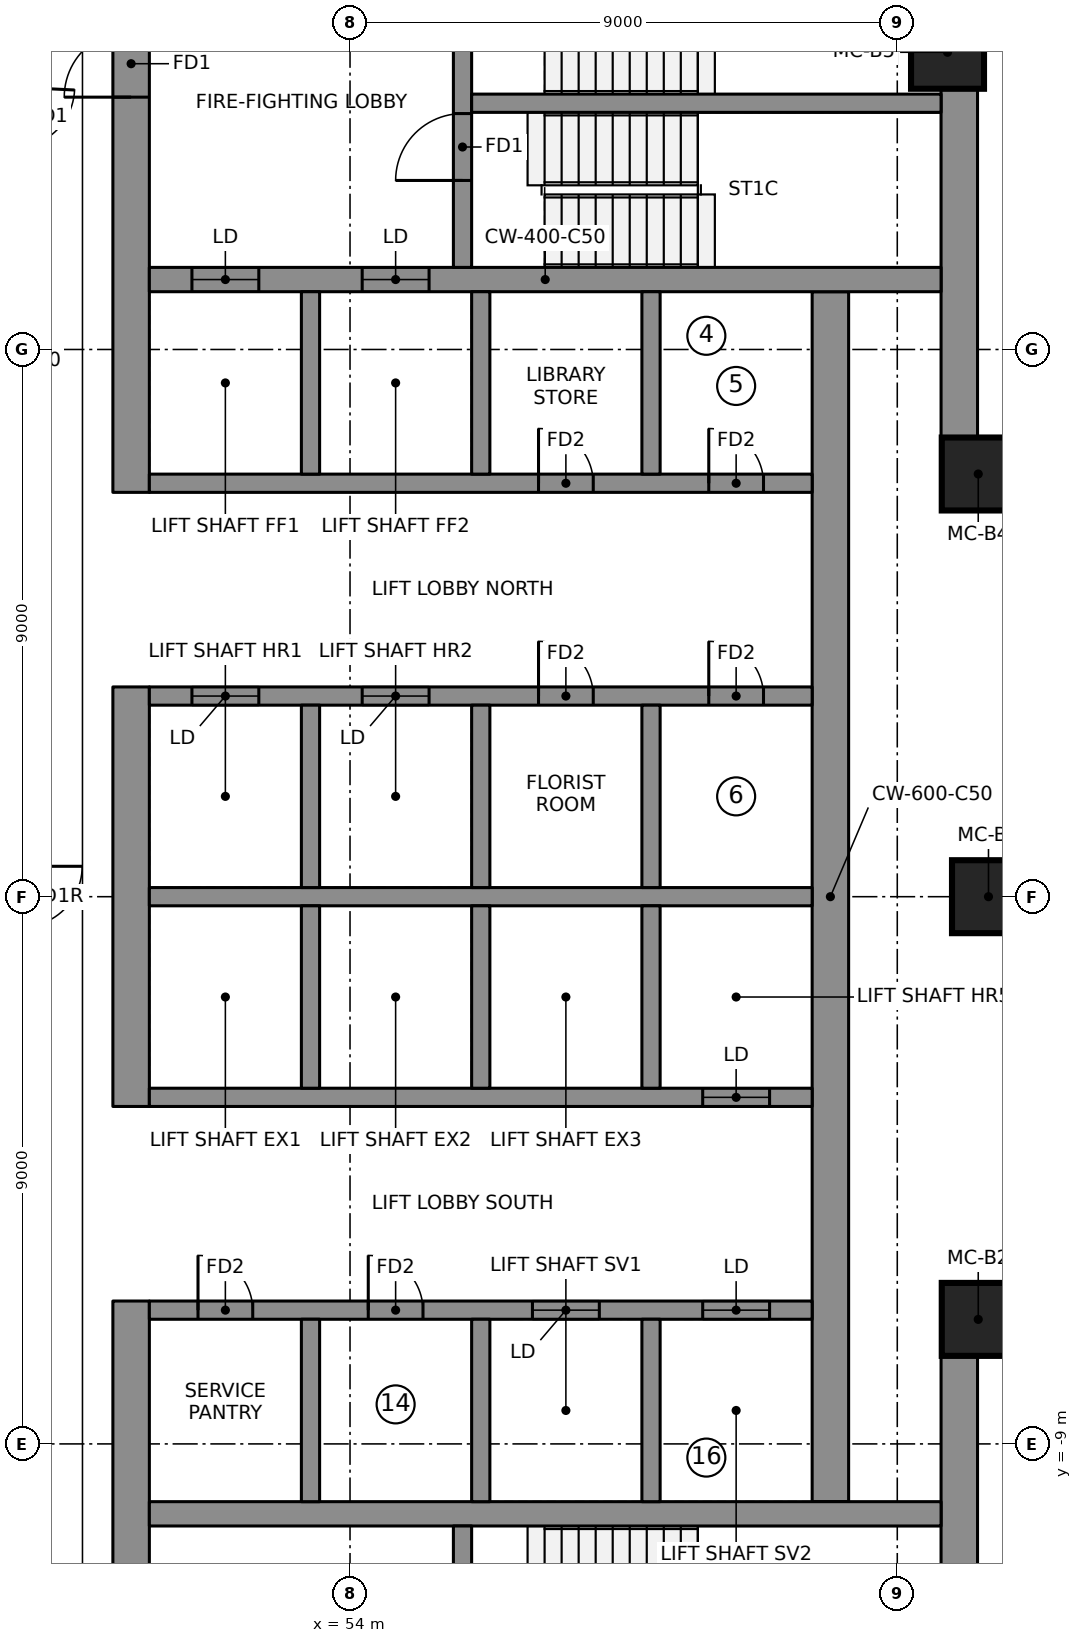
"""IFC4 building model, lengths in metres.
Left out: names, types, materials, properties, quantities, classifications, styles, units other than length and angle.
Written with IfcOpenShell. Run it as: python <this file> out.ifc"""

import sys

from ifc_helpers import new_model, si_unit, direction, frame, frame_2d, origin, origin_2d, place, context, subcontext, project, spatial, rectangle, extrude, element, fill, save


model = new_model("IFC4")
c1 = context("Model", 3, precision=1e-05, world=origin(), true_north=direction((0.0, 1.0)))
c2 = subcontext(c1, "Body", "Model", "MODEL_VIEW")
j1 = project(units=[si_unit("LENGTHUNIT", "METRE"), si_unit("PLANEANGLEUNIT", "RADIAN")], contexts=[c1])
p1 = place(None, origin())
s1 = spatial("IfcSite", under=j1, at=p1, CompositionType="ELEMENT")
p2 = place(p1, origin())
s2 = spatial("IfcBuilding", under=s1, at=p2, CompositionType="ELEMENT")
p3 = place(p2, frame((0.0, 0.0, 245.65)))
s3 = spatial("IfcBuildingStorey", under=s2, at=p3, CompositionType="ELEMENT", Elevation=245.65)
p4 = place(p3, frame((50.4, 6.65, 0.0), z_axis=(0.0, 0.0, 1.0), x_axis=(0.0, 1.0, 0.0)))
e1 = element("IfcWall", 1, at=p4, inside=s3, PredefinedType="SHEAR", context=c2, shape_type="SweptSolid", body=[
    extrude(rectangle(XDim=9.7, YDim=0.6, at=frame_2d((4.85, 0.0))), origin(), (0.0, 0.0, 1.0), 3.55),
])
p5 = place(p4, frame((6.5, 0.0, 0.0)))
e2 = element("IfcOpeningElement", 2, at=p5, cuts=e1, PredefinedType="OPENING", context=c2, shape_type="SweptSolid", body=[
    extrude(rectangle(XDim=1.1, YDim=2.1, at=frame_2d((0.55, 1.05))), frame((0.0, 0.31, 0.0), z_axis=(0.0, -1.0, 0.0), x_axis=(1.0, 0.0, 0.0)), (0.0, 0.0, 1.0), 0.62),
])
p6 = place(p3, frame((50.4, -3.45, 0.0), z_axis=(0.0, 0.0, 1.0), x_axis=(0.0, 1.0, 0.0)))
e3 = element("IfcWall", 3, at=p6, inside=s3, PredefinedType="SHEAR", context=c2, shape_type="SweptSolid", body=[
    extrude(rectangle(XDim=6.9, YDim=0.6, at=frame_2d((3.45, 0.0))), origin(), (0.0, 0.0, 1.0), 3.55),
])
p7 = place(p3, frame((50.4, -16.35, 0.0), z_axis=(0.0, 0.0, 1.0), x_axis=(0.0, 1.0, 0.0)))
e4 = element("IfcWall", 4, at=p7, inside=s3, PredefinedType="SHEAR", context=c2, shape_type="SweptSolid", body=[
    extrude(rectangle(XDim=9.7, YDim=0.6, at=frame_2d((4.85, 0.0))), origin(), (0.0, 0.0, 1.0), 3.55),
])
p8 = place(p7, frame((2.1, 0.0, 0.0)))
e5 = element("IfcOpeningElement", 5, at=p8, cuts=e4, PredefinedType="OPENING", context=c2, shape_type="SweptSolid", body=[
    extrude(rectangle(XDim=1.1, YDim=2.1, at=frame_2d((0.55, 1.05))), frame((0.0, 0.31, 0.0), z_axis=(0.0, -1.0, 0.0), x_axis=(1.0, 0.0, 0.0)), (0.0, 0.0, 1.0), 0.62),
])
for number, where, z_axis, x_axis in (
    (6, (64.02, 7.502, 0.0), (0.0, 0.0, 1.0), (0.0, 1.0, 0.0)),
    (7, (64.02, -15.75, 0.0), (0.0, 0.0, 1.0), (0.0, 1.0, 0.0)),
):
    element("IfcWall", number, at=place(p3, frame(where, z_axis=z_axis, x_axis=x_axis)), inside=s3, PredefinedType="SHEAR", context=c2, shape_type="SweptSolid", body=[
        extrude(rectangle(XDim=8.248, YDim=0.6, at=frame_2d((4.124, 0.0))), origin(), (0.0, 0.0, 1.0), 3.55),
    ])
p9 = place(p3, frame((61.9, -9.95, 0.0), z_axis=(0.0, 0.0, 1.0), x_axis=(0.0, 1.0, 0.0)))
e8 = element("IfcWall", 8, at=p9, inside=s3, PredefinedType="SHEAR", context=c2, shape_type="SweptSolid", body=[
    extrude(rectangle(XDim=19.9, YDim=0.6, at=frame_2d((9.95, 0.0))), origin(), (0.0, 0.0, 1.0), 3.55),
])
p10 = place(p3, frame((50.7, 10.15, 0.0), z_axis=(0.0, 0.0, 1.0), x_axis=(1.0, 0.0, 0.0)))
e9 = element("IfcWall", 9, at=p10, inside=s3, PredefinedType="SHEAR", context=c2, shape_type="SweptSolid", body=[
    extrude(rectangle(XDim=13.02, YDim=0.4, at=frame_2d((6.51, 0.0))), origin(), (0.0, 0.0, 1.0), 3.55),
])
p11 = place(p10, frame((0.7, 0.0, 0.0)))
e10 = element("IfcOpeningElement", 10, at=p11, cuts=e9, PredefinedType="OPENING", context=c2, shape_type="SweptSolid", body=[
    extrude(rectangle(XDim=1.1, YDim=2.1, at=frame_2d((0.55, 1.05))), frame((0.0, 0.21, 0.0), z_axis=(0.0, -1.0, 0.0), x_axis=(1.0, 0.0, 0.0)), (0.0, 0.0, 1.0), 0.42),
])
p12 = place(p10, frame((3.5, 0.0, 0.0)))
e11 = element("IfcOpeningElement", 11, at=p12, cuts=e9, PredefinedType="OPENING", context=c2, shape_type="SweptSolid", body=[
    extrude(rectangle(XDim=1.1, YDim=2.1, at=frame_2d((0.55, 1.05))), frame((0.0, 0.21, 0.0), z_axis=(0.0, -1.0, 0.0), x_axis=(1.0, 0.0, 0.0)), (0.0, 0.0, 1.0), 0.42),
])
p13 = place(p3, frame((50.7, -10.15, 0.0), z_axis=(0.0, 0.0, 1.0), x_axis=(1.0, 0.0, 0.0)))
e12 = element("IfcWall", 12, at=p13, inside=s3, PredefinedType="SHEAR", context=c2, shape_type="SweptSolid", body=[
    extrude(rectangle(XDim=13.02, YDim=0.4, at=frame_2d((6.51, 0.0))), origin(), (0.0, 0.0, 1.0), 3.55),
])
p14 = place(p3, frame((50.7, 0.0, 0.0), z_axis=(0.0, 0.0, 1.0), x_axis=(1.0, 0.0, 0.0)))
e13 = element("IfcWall", 13, at=p14, inside=s3, PredefinedType="SHEAR", context=c2, shape_type="SweptSolid", body=[
    extrude(rectangle(XDim=10.9, YDim=0.3, at=frame_2d((5.45, 0.0))), origin(), (0.0, 0.0, 1.0), 3.55),
])
p15 = place(p3, frame((50.7, 3.3, 0.0), z_axis=(0.0, 0.0, 1.0), x_axis=(1.0, 0.0, 0.0)))
e14 = element("IfcWall", 14, at=p15, inside=s3, PredefinedType="SHEAR", context=c2, shape_type="SweptSolid", body=[
    extrude(rectangle(XDim=10.9, YDim=0.3, at=frame_2d((5.45, 0.0))), origin(), (0.0, 0.0, 1.0), 3.55),
])
p16 = place(p15, frame((0.7, 0.0, 0.0)))
e15 = element("IfcOpeningElement", 15, at=p16, cuts=e14, PredefinedType="OPENING", context=c2, shape_type="SweptSolid", body=[
    extrude(rectangle(XDim=1.1, YDim=2.1, at=frame_2d((0.55, 1.05))), frame((0.0, 0.16, 0.0), z_axis=(0.0, -1.0, 0.0), x_axis=(1.0, 0.0, 0.0)), (0.0, 0.0, 1.0), 0.32),
])
p17 = place(p15, frame((3.5, 0.0, 0.0)))
e16 = element("IfcOpeningElement", 16, at=p17, cuts=e14, PredefinedType="OPENING", context=c2, shape_type="SweptSolid", body=[
    extrude(rectangle(XDim=1.1, YDim=2.1, at=frame_2d((0.55, 1.05))), frame((0.0, 0.16, 0.0), z_axis=(0.0, -1.0, 0.0), x_axis=(1.0, 0.0, 0.0)), (0.0, 0.0, 1.0), 0.32),
])
p18 = place(p15, frame((6.4, 0.0, 0.0)))
e17 = element("IfcOpeningElement", 17, at=p18, cuts=e14, PredefinedType="OPENING", context=c2, shape_type="SweptSolid", body=[
    extrude(rectangle(XDim=0.9, YDim=2.1, at=frame_2d((0.45, 1.05))), frame((0.0, 0.16, 0.0), z_axis=(0.0, -1.0, 0.0), x_axis=(1.0, 0.0, 0.0)), (0.0, 0.0, 1.0), 0.32),
])
p19 = place(p15, frame((9.2, 0.0, 0.0)))
e18 = element("IfcOpeningElement", 18, at=p19, cuts=e14, PredefinedType="OPENING", context=c2, shape_type="SweptSolid", body=[
    extrude(rectangle(XDim=0.9, YDim=2.1, at=frame_2d((0.45, 1.05))), frame((0.0, 0.16, 0.0), z_axis=(0.0, -1.0, 0.0), x_axis=(1.0, 0.0, 0.0)), (0.0, 0.0, 1.0), 0.32),
])
p20 = place(p3, frame((50.7, 6.8, 0.0), z_axis=(0.0, 0.0, 1.0), x_axis=(1.0, 0.0, 0.0)))
e19 = element("IfcWall", 19, at=p20, inside=s3, PredefinedType="SHEAR", context=c2, shape_type="SweptSolid", body=[
    extrude(rectangle(XDim=10.9, YDim=0.3, at=frame_2d((5.45, 0.0))), origin(), (0.0, 0.0, 1.0), 3.55),
])
p21 = place(p20, frame((6.4, 0.0, 0.0)))
e20 = element("IfcOpeningElement", 20, at=p21, cuts=e19, PredefinedType="OPENING", context=c2, shape_type="SweptSolid", body=[
    extrude(rectangle(XDim=0.9, YDim=2.1, at=frame_2d((0.45, 1.05))), frame((0.0, 0.16, 0.0), z_axis=(0.0, -1.0, 0.0), x_axis=(1.0, 0.0, 0.0)), (0.0, 0.0, 1.0), 0.32),
])
p22 = place(p20, frame((9.2, 0.0, 0.0)))
e21 = element("IfcOpeningElement", 21, at=p22, cuts=e19, PredefinedType="OPENING", context=c2, shape_type="SweptSolid", body=[
    extrude(rectangle(XDim=0.9, YDim=2.1, at=frame_2d((0.45, 1.05))), frame((0.0, 0.16, 0.0), z_axis=(0.0, -1.0, 0.0), x_axis=(1.0, 0.0, 0.0)), (0.0, 0.0, 1.0), 0.32),
])
for number, where, z_axis, x_axis in (
    (22, (53.35, 0.15, 0.0), (0.0, 0.0, 1.0), (0.0, 1.0, 0.0)),
    (23, (53.35, 6.95, 0.0), (0.0, 0.0, 1.0), (0.0, 1.0, 0.0)),
    (24, (56.15, 0.15, 0.0), (0.0, 0.0, 1.0), (0.0, 1.0, 0.0)),
    (25, (56.15, 6.95, 0.0), (0.0, 0.0, 1.0), (0.0, 1.0, 0.0)),
    (26, (58.95, 0.15, 0.0), (0.0, 0.0, 1.0), (0.0, 1.0, 0.0)),
    (27, (58.95, 6.95, 0.0), (0.0, 0.0, 1.0), (0.0, 1.0, 0.0)),
):
    element("IfcWall", number, at=place(p3, frame(where, z_axis=z_axis, x_axis=x_axis)), inside=s3, PredefinedType="SHEAR", context=c2, shape_type="SweptSolid", body=[
        extrude(rectangle(XDim=3.0, YDim=0.3, at=frame_2d((1.5, 0.0))), origin(), (0.0, 0.0, 1.0), 3.55),
    ])
p23 = place(p3, frame((50.7, -3.3, 0.0), z_axis=(0.0, 0.0, 1.0), x_axis=(1.0, 0.0, 0.0)))
e28 = element("IfcWall", 28, at=p23, inside=s3, PredefinedType="SHEAR", context=c2, shape_type="SweptSolid", body=[
    extrude(rectangle(XDim=10.9, YDim=0.3, at=frame_2d((5.45, 0.0))), origin(), (0.0, 0.0, 1.0), 3.55),
])
p24 = place(p23, frame((9.1, 0.0, 0.0)))
e29 = element("IfcOpeningElement", 29, at=p24, cuts=e28, PredefinedType="OPENING", context=c2, shape_type="SweptSolid", body=[
    extrude(rectangle(XDim=1.1, YDim=2.1, at=frame_2d((0.55, 1.05))), frame((0.0, 0.16, 0.0), z_axis=(0.0, -1.0, 0.0), x_axis=(1.0, 0.0, 0.0)), (0.0, 0.0, 1.0), 0.32),
])
p25 = place(p3, frame((50.7, -6.8, 0.0), z_axis=(0.0, 0.0, 1.0), x_axis=(1.0, 0.0, 0.0)))
e30 = element("IfcWall", 30, at=p25, inside=s3, PredefinedType="SHEAR", context=c2, shape_type="SweptSolid", body=[
    extrude(rectangle(XDim=10.9, YDim=0.3, at=frame_2d((5.45, 0.0))), origin(), (0.0, 0.0, 1.0), 3.55),
])
p26 = place(p25, frame((6.3, 0.0, 0.0)))
e31 = element("IfcOpeningElement", 31, at=p26, cuts=e30, PredefinedType="OPENING", context=c2, shape_type="SweptSolid", body=[
    extrude(rectangle(XDim=1.1, YDim=2.1, at=frame_2d((0.55, 1.05))), frame((0.0, 0.16, 0.0), z_axis=(0.0, -1.0, 0.0), x_axis=(1.0, 0.0, 0.0)), (0.0, 0.0, 1.0), 0.32),
])
p27 = place(p25, frame((9.1, 0.0, 0.0)))
e32 = element("IfcOpeningElement", 32, at=p27, cuts=e30, PredefinedType="OPENING", context=c2, shape_type="SweptSolid", body=[
    extrude(rectangle(XDim=1.1, YDim=2.1, at=frame_2d((0.55, 1.05))), frame((0.0, 0.16, 0.0), z_axis=(0.0, -1.0, 0.0), x_axis=(1.0, 0.0, 0.0)), (0.0, 0.0, 1.0), 0.32),
])
p28 = place(p25, frame((0.8, 0.0, 0.0)))
e33 = element("IfcOpeningElement", 33, at=p28, cuts=e30, PredefinedType="OPENING", context=c2, shape_type="SweptSolid", body=[
    extrude(rectangle(XDim=0.9, YDim=2.1, at=frame_2d((0.45, 1.05))), frame((0.0, 0.16, 0.0), z_axis=(0.0, -1.0, 0.0), x_axis=(1.0, 0.0, 0.0)), (0.0, 0.0, 1.0), 0.32),
])
p29 = place(p25, frame((3.6, 0.0, 0.0)))
e34 = element("IfcOpeningElement", 34, at=p29, cuts=e30, PredefinedType="OPENING", context=c2, shape_type="SweptSolid", body=[
    extrude(rectangle(XDim=0.9, YDim=2.1, at=frame_2d((0.45, 1.05))), frame((0.0, 0.16, 0.0), z_axis=(0.0, -1.0, 0.0), x_axis=(1.0, 0.0, 0.0)), (0.0, 0.0, 1.0), 0.32),
])
for number, where, z_axis, x_axis in (
    (35, (53.35, -3.15, 0.0), (0.0, 0.0, 1.0), (0.0, 1.0, 0.0)),
    (36, (53.35, -9.95, 0.0), (0.0, 0.0, 1.0), (0.0, 1.0, 0.0)),
    (37, (56.15, -3.15, 0.0), (0.0, 0.0, 1.0), (0.0, 1.0, 0.0)),
    (38, (56.15, -9.95, 0.0), (0.0, 0.0, 1.0), (0.0, 1.0, 0.0)),
    (39, (58.95, -3.15, 0.0), (0.0, 0.0, 1.0), (0.0, 1.0, 0.0)),
    (40, (58.95, -9.95, 0.0), (0.0, 0.0, 1.0), (0.0, 1.0, 0.0)),
):
    element("IfcWall", number, at=place(p3, frame(where, z_axis=z_axis, x_axis=x_axis)), inside=s3, PredefinedType="SHEAR", context=c2, shape_type="SweptSolid", body=[
        extrude(rectangle(XDim=3.0, YDim=0.3, at=frame_2d((1.5, 0.0))), origin(), (0.0, 0.0, 1.0), 3.55),
    ])
p30 = place(p3, frame((55.85, 10.35, 0.0), z_axis=(0.0, 0.0, 1.0), x_axis=(0.0, 1.0, 0.0)))
e41 = element("IfcWall", 41, at=p30, inside=s3, PredefinedType="SHEAR", context=c2, shape_type="SweptSolid", body=[
    extrude(rectangle(XDim=5.4, YDim=0.3, at=frame_2d((2.7, 0.0))), origin(), (0.0, 0.0, 1.0), 3.55),
])
p31 = place(p30, frame((1.43, 0.0, 0.0)))
e42 = element("IfcOpeningElement", 42, at=p31, cuts=e41, PredefinedType="OPENING", context=c2, shape_type="SweptSolid", body=[
    extrude(rectangle(XDim=1.1, YDim=2.1, at=frame_2d((0.55, 1.05))), frame((0.0, 0.16, 0.0), z_axis=(0.0, -1.0, 0.0), x_axis=(1.0, 0.0, 0.0)), (0.0, 0.0, 1.0), 0.32),
])
p32 = place(p30, frame((3.6, 0.0, 0.0)))
e43 = element("IfcOpeningElement", 43, at=p32, cuts=e41, PredefinedType="OPENING", context=c2, shape_type="SweptSolid", body=[
    extrude(rectangle(XDim=1.1, YDim=2.1, at=frame_2d((0.55, 1.05))), frame((0.0, 0.16, 0.0), z_axis=(0.0, -1.0, 0.0), x_axis=(1.0, 0.0, 0.0)), (0.0, 0.0, 1.0), 0.32),
])
p33 = place(p3, frame((55.85, -15.75, 0.0), z_axis=(0.0, 0.0, 1.0), x_axis=(0.0, 1.0, 0.0)))
e44 = element("IfcWall", 44, at=p33, inside=s3, PredefinedType="SHEAR", context=c2, shape_type="SweptSolid", body=[
    extrude(rectangle(XDim=5.4, YDim=0.3, at=frame_2d((2.7, 0.0))), origin(), (0.0, 0.0, 1.0), 3.55),
])
p34 = place(p33, frame((3.6, 0.0, 0.0)))
e45 = element("IfcOpeningElement", 45, at=p34, cuts=e44, PredefinedType="OPENING", context=c2, shape_type="SweptSolid", body=[
    extrude(rectangle(XDim=1.1, YDim=2.1, at=frame_2d((0.55, 1.05))), frame((0.0, 0.16, 0.0), z_axis=(0.0, -1.0, 0.0), x_axis=(1.0, 0.0, 0.0)), (0.0, 0.0, 1.0), 0.32),
])
p35 = place(p33, frame((0.8, 0.0, 0.0)))
e46 = element("IfcOpeningElement", 46, at=p35, cuts=e44, PredefinedType="OPENING", context=c2, shape_type="SweptSolid", body=[
    extrude(rectangle(XDim=0.9, YDim=2.1, at=frame_2d((0.45, 1.05))), frame((0.0, 0.16, 0.0), z_axis=(0.0, -1.0, 0.0), x_axis=(1.0, 0.0, 0.0)), (0.0, 0.0, 1.0), 0.32),
])
p36 = place(p3, frame((56.0, 13.05, 0.0), z_axis=(0.0, 0.0, 1.0), x_axis=(1.0, 0.0, 0.0)))
e47 = element("IfcWall", 47, at=p36, inside=s3, PredefinedType="SHEAR", context=c2, shape_type="SweptSolid", body=[
    extrude(rectangle(XDim=7.72, YDim=0.3, at=frame_2d((3.86, 0.0))), origin(), (0.0, 0.0, 1.0), 3.55),
])
for number, where, z_axis, x_axis in (
    (48, (64.332, -6.952, 0.0), (0.0, 0.0, 1.0), (1.0, 0.0, 0.0)),
    (49, (64.5, 0.0, 0.0), (0.0, 0.0, 1.0), (1.0, 0.0, 0.0)),
    (50, (64.332, 6.952, 0.0), (0.0, 0.0, 1.0), (1.0, 0.0, 0.0)),
    (51, (63.826, 13.888, 0.0), (0.0, 0.0, 1.0), (1.0, 0.0, 0.0)),
):
    element("IfcColumn", number, at=place(p3, frame(where, z_axis=z_axis, x_axis=x_axis)), inside=s3, PredefinedType="COLUMN", context=c2, shape_type="SweptSolid", body=[
        extrude(rectangle(XDim=1.2, YDim=1.2, at=origin_2d()), origin(), (0.0, 0.0, 1.0), 3.55),
    ])
p37 = place(p11, origin())
e52 = element("IfcDoor", 52, at=p37, inside=s3, OperationType="DOUBLE_DOOR_SLIDING", PredefinedType="DOOR", context=c2, shape_type="SweptSolid", body=[
    extrude(rectangle(XDim=1.1, YDim=2.1, at=frame_2d((0.55, 1.05))), frame((0.0, 0.025, 0.0), z_axis=(0.0, -1.0, 0.0), x_axis=(1.0, 0.0, 0.0)), (0.0, 0.0, 1.0), 0.05),
])
fill(e10, e52)
p38 = place(p12, origin())
e53 = element("IfcDoor", 53, at=p38, inside=s3, OperationType="DOUBLE_DOOR_SLIDING", PredefinedType="DOOR", context=c2, shape_type="SweptSolid", body=[
    extrude(rectangle(XDim=1.1, YDim=2.1, at=frame_2d((0.55, 1.05))), frame((0.0, 0.025, 0.0), z_axis=(0.0, -1.0, 0.0), x_axis=(1.0, 0.0, 0.0)), (0.0, 0.0, 1.0), 0.05),
])
fill(e11, e53)
p39 = place(p16, origin())
e54 = element("IfcDoor", 54, at=p39, inside=s3, OperationType="DOUBLE_DOOR_SLIDING", PredefinedType="DOOR", context=c2, shape_type="SweptSolid", body=[
    extrude(rectangle(XDim=1.1, YDim=2.1, at=frame_2d((0.55, 1.05))), frame((0.0, 0.025, 0.0), z_axis=(0.0, -1.0, 0.0), x_axis=(1.0, 0.0, 0.0)), (0.0, 0.0, 1.0), 0.05),
])
fill(e15, e54)
p40 = place(p17, origin())
e55 = element("IfcDoor", 55, at=p40, inside=s3, OperationType="DOUBLE_DOOR_SLIDING", PredefinedType="DOOR", context=c2, shape_type="SweptSolid", body=[
    extrude(rectangle(XDim=1.1, YDim=2.1, at=frame_2d((0.55, 1.05))), frame((0.0, 0.025, 0.0), z_axis=(0.0, -1.0, 0.0), x_axis=(1.0, 0.0, 0.0)), (0.0, 0.0, 1.0), 0.05),
])
fill(e16, e55)
p41 = place(p24, origin())
e56 = element("IfcDoor", 56, at=p41, inside=s3, OperationType="DOUBLE_DOOR_SLIDING", PredefinedType="DOOR", context=c2, shape_type="SweptSolid", body=[
    extrude(rectangle(XDim=1.1, YDim=2.1, at=frame_2d((0.55, 1.05))), frame((0.0, 0.025, 0.0), z_axis=(0.0, -1.0, 0.0), x_axis=(1.0, 0.0, 0.0)), (0.0, 0.0, 1.0), 0.05),
])
fill(e29, e56)
p42 = place(p26, origin())
e57 = element("IfcDoor", 57, at=p42, inside=s3, OperationType="DOUBLE_DOOR_SLIDING", PredefinedType="DOOR", context=c2, shape_type="SweptSolid", body=[
    extrude(rectangle(XDim=1.1, YDim=2.1, at=frame_2d((0.55, 1.05))), frame((0.0, 0.025, 0.0), z_axis=(0.0, -1.0, 0.0), x_axis=(1.0, 0.0, 0.0)), (0.0, 0.0, 1.0), 0.05),
])
fill(e31, e57)
p43 = place(p27, origin())
e58 = element("IfcDoor", 58, at=p43, inside=s3, OperationType="DOUBLE_DOOR_SLIDING", PredefinedType="DOOR", context=c2, shape_type="SweptSolid", body=[
    extrude(rectangle(XDim=1.1, YDim=2.1, at=frame_2d((0.55, 1.05))), frame((0.0, 0.025, 0.0), z_axis=(0.0, -1.0, 0.0), x_axis=(1.0, 0.0, 0.0)), (0.0, 0.0, 1.0), 0.05),
])
fill(e32, e58)
p44 = place(p31, origin())
e59 = element("IfcDoor", 59, at=p44, inside=s3, OperationType="SINGLE_SWING_RIGHT", PredefinedType="DOOR", context=c2, shape_type="SweptSolid", body=[
    extrude(rectangle(XDim=1.1, YDim=2.1, at=frame_2d((0.55, 1.05))), frame((0.0, 0.025, 0.0), z_axis=(0.0, -1.0, 0.0), x_axis=(1.0, 0.0, 0.0)), (0.0, 0.0, 1.0), 0.05),
])
fill(e42, e59)
p45 = place(p5, origin())
e60 = element("IfcDoor", 60, at=p45, inside=s3, OperationType="SINGLE_SWING_RIGHT", PredefinedType="DOOR", context=c2, shape_type="SweptSolid", body=[
    extrude(rectangle(XDim=1.1, YDim=2.1, at=frame_2d((0.55, 1.05))), frame((0.0, 0.025, 0.0), z_axis=(0.0, -1.0, 0.0), x_axis=(1.0, 0.0, 0.0)), (0.0, 0.0, 1.0), 0.05),
])
fill(e2, e60)
p46 = place(p21, origin())
e61 = element("IfcDoor", 61, at=p46, inside=s3, OperationType="SINGLE_SWING_LEFT", PredefinedType="DOOR", context=c2, shape_type="SweptSolid", body=[
    extrude(rectangle(XDim=0.9, YDim=2.1, at=frame_2d((0.45, 1.05))), frame((0.0, 0.025, 0.0), z_axis=(0.0, -1.0, 0.0), x_axis=(1.0, 0.0, 0.0)), (0.0, 0.0, 1.0), 0.05),
])
fill(e20, e61)
p47 = place(p22, origin())
e62 = element("IfcDoor", 62, at=p47, inside=s3, OperationType="SINGLE_SWING_LEFT", PredefinedType="DOOR", context=c2, shape_type="SweptSolid", body=[
    extrude(rectangle(XDim=0.9, YDim=2.1, at=frame_2d((0.45, 1.05))), frame((0.0, 0.025, 0.0), z_axis=(0.0, -1.0, 0.0), x_axis=(1.0, 0.0, 0.0)), (0.0, 0.0, 1.0), 0.05),
])
fill(e21, e62)
p48 = place(p18, origin())
e63 = element("IfcDoor", 63, at=p48, inside=s3, OperationType="SINGLE_SWING_LEFT", PredefinedType="DOOR", context=c2, shape_type="SweptSolid", body=[
    extrude(rectangle(XDim=0.9, YDim=2.1, at=frame_2d((0.45, 1.05))), frame((0.0, 0.025, 0.0), z_axis=(0.0, -1.0, 0.0), x_axis=(1.0, 0.0, 0.0)), (0.0, 0.0, 1.0), 0.05),
])
fill(e17, e63)
p49 = place(p19, origin())
e64 = element("IfcDoor", 64, at=p49, inside=s3, OperationType="SINGLE_SWING_LEFT", PredefinedType="DOOR", context=c2, shape_type="SweptSolid", body=[
    extrude(rectangle(XDim=0.9, YDim=2.1, at=frame_2d((0.45, 1.05))), frame((0.0, 0.025, 0.0), z_axis=(0.0, -1.0, 0.0), x_axis=(1.0, 0.0, 0.0)), (0.0, 0.0, 1.0), 0.05),
])
fill(e18, e64)
p50 = place(p28, origin())
e65 = element("IfcDoor", 65, at=p50, inside=s3, OperationType="SINGLE_SWING_LEFT", PredefinedType="DOOR", context=c2, shape_type="SweptSolid", body=[
    extrude(rectangle(XDim=0.9, YDim=2.1, at=frame_2d((0.45, 1.05))), frame((0.0, 0.025, 0.0), z_axis=(0.0, -1.0, 0.0), x_axis=(1.0, 0.0, 0.0)), (0.0, 0.0, 1.0), 0.05),
])
fill(e33, e65)
p51 = place(p29, origin())
e66 = element("IfcDoor", 66, at=p51, inside=s3, OperationType="SINGLE_SWING_LEFT", PredefinedType="DOOR", context=c2, shape_type="SweptSolid", body=[
    extrude(rectangle(XDim=0.9, YDim=2.1, at=frame_2d((0.45, 1.05))), frame((0.0, 0.025, 0.0), z_axis=(0.0, -1.0, 0.0), x_axis=(1.0, 0.0, 0.0)), (0.0, 0.0, 1.0), 0.05),
])
fill(e34, e66)
save(model, sys.argv[1])
